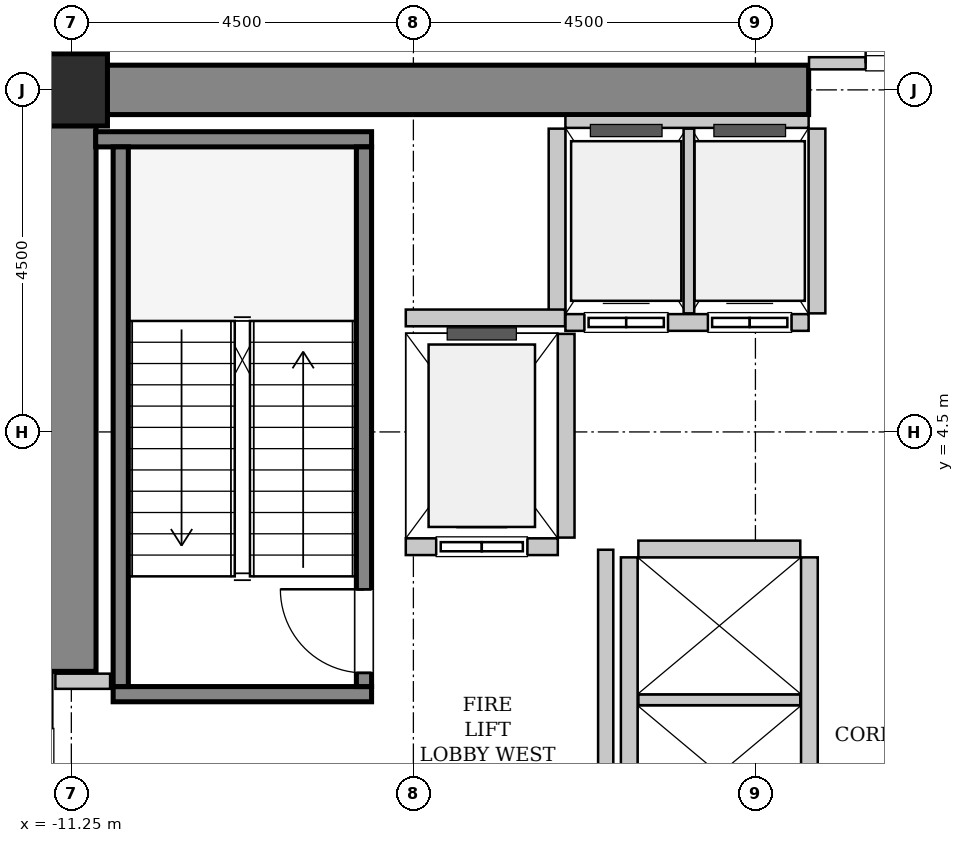
"""IFC4 building model, lengths in metres.
Left out: names, types, materials, properties, quantities, classifications, styles, units other than length and angle.
Written with IfcOpenShell. Run it as: python <this file> out.ifc"""

import sys

from ifc_helpers import new_model, si_unit, direction, frame, frame_2d, origin, origin_2d, place, context, subcontext, project, spatial, rectangle, hollow_rectangle, extrude, source, transform, mapped, element, fill, save


model = new_model("IFC4")
c1 = context("Model", 3, precision=1e-05, world=origin(), true_north=direction((0.0, 1.0)))
c2 = subcontext(c1, "Body", "Model", "MODEL_VIEW")
j1 = project(units=[si_unit("LENGTHUNIT", "METRE"), si_unit("PLANEANGLEUNIT", "RADIAN")], contexts=[c1])
p1 = place(None, origin())
s1 = spatial("IfcSite", under=j1, at=p1, CompositionType="ELEMENT")
p2 = place(p1, origin())
s2 = spatial("IfcBuilding", under=s1, at=p2, CompositionType="ELEMENT")
p3 = place(p2, frame((0.0, 0.0, 86.2)))
s3 = spatial("IfcBuildingStorey", under=s2, at=p3, CompositionType="ELEMENT", Elevation=86.2)
m1 = source(origin(), c2, "Body", "SweptSolid", [
    extrude(rectangle(XDim=10.025, YDim=0.65, at=frame_2d((5.012, 0.0))), origin(), (0.0, 0.0, 1.0), 4.6),
])
p4 = place(p3, frame((-11.575, 9.0, 0.0), z_axis=(0.0, 0.0, 1.0), x_axis=(1.0, 0.0, 0.0)))
e1 = element("IfcWall", 1, at=p4, inside=s3, PredefinedType="SHEAR", context=c2, shape_type="MappedRepresentation", body=[
    mapped(m1, transform((0.0, 0.0, 0.0), x_axis=(1.0, 0.0, 0.0), y_axis=(0.0, 1.0, 0.0), z_axis=(0.0, 0.0, 1.0), scale=1.0)),
])
m2 = source(origin(), c2, "Body", "SweptSolid", [
    extrude(rectangle(XDim=7.325, YDim=0.65, at=frame_2d((3.663, 0.0))), origin(), (0.0, 0.0, 1.0), 4.6),
])
p5 = place(p3, frame((-11.25, 1.35, 0.0), z_axis=(0.0, 0.0, 1.0), x_axis=(0.0, 1.0, 0.0)))
e2 = element("IfcWall", 2, at=p5, inside=s3, PredefinedType="SHEAR", context=c2, shape_type="MappedRepresentation", body=[
    mapped(m2, transform((0.0, 0.0, 0.0), x_axis=(1.0, 0.0, 0.0), y_axis=(0.0, 1.0, 0.0), z_axis=(0.0, 0.0, 1.0), scale=1.0)),
])
m3 = source(origin(), c2, "Body", "SweptSolid", [
    extrude(hollow_rectangle(XDim=0.95, YDim=0.95, WallThickness=0.045, InnerFilletRadius=0.045, OuterFilletRadius=0.09, at=origin_2d()), origin(), (0.0, 0.0, 1.0), 4.6),
])
p6 = place(p3, frame((-11.25, 9.0, 0.0), z_axis=(0.0, 0.0, 1.0), x_axis=(1.0, 0.0, 0.0)))
e3 = element("IfcColumn", 3, at=p6, inside=s3, PredefinedType="COLUMN", context=c2, shape_type="MappedRepresentation", body=[
    mapped(m3, transform((0.0, 0.0, 0.0), x_axis=(1.0, 0.0, 0.0), y_axis=(0.0, 1.0, 0.0), z_axis=(0.0, 0.0, 1.0), scale=1.0)),
])
m4 = source(origin(), c2, "Body", "SweptSolid", [
    extrude(rectangle(XDim=3.4, YDim=0.2, at=frame_2d((1.7, 0.0))), origin(), (0.0, 0.0, 1.0), 4.6),
])
p7 = place(p3, frame((-7.3, 1.05, 0.0), z_axis=(0.0, 0.0, 1.0), x_axis=(-1.0, 0.0, 0.0)))
e4 = element("IfcWall", 4, at=p7, inside=s3, PredefinedType="SOLIDWALL", context=c2, shape_type="MappedRepresentation", body=[
    mapped(m4, transform((0.0, 0.0, 0.0), x_axis=(1.0, 0.0, 0.0), y_axis=(0.0, 1.0, 0.0), z_axis=(0.0, 0.0, 1.0), scale=1.0)),
])
m5 = source(origin(), c2, "Body", "SweptSolid", [
    extrude(rectangle(XDim=3.63, YDim=0.2, at=frame_2d((1.815, 0.0))), origin(), (0.0, 0.0, 1.0), 4.6),
])
p8 = place(p3, frame((-7.3, 8.35, 0.0), z_axis=(0.0, 0.0, 1.0), x_axis=(-1.0, 0.0, 0.0)))
e5 = element("IfcWall", 5, at=p8, inside=s3, PredefinedType="SOLIDWALL", context=c2, shape_type="MappedRepresentation", body=[
    mapped(m5, transform((0.0, 0.0, 0.0), x_axis=(1.0, 0.0, 0.0), y_axis=(0.0, 1.0, 0.0), z_axis=(0.0, 0.0, 1.0), scale=1.0)),
])
m6 = source(origin(), c2, "Body", "SweptSolid", [
    extrude(rectangle(XDim=7.1, YDim=0.2, at=frame_2d((3.55, 0.0))), origin(), (0.0, 0.0, 1.0), 4.6),
])
p9 = place(p3, frame((-7.4, 1.15, 0.0), z_axis=(0.0, 0.0, 1.0), x_axis=(0.0, 1.0, 0.0)))
e6 = element("IfcWall", 6, at=p9, inside=s3, PredefinedType="SOLIDWALL", context=c2, shape_type="MappedRepresentation", body=[
    mapped(m6, transform((0.0, 0.0, 0.0), x_axis=(1.0, 0.0, 0.0), y_axis=(0.0, 1.0, 0.0), z_axis=(0.0, 0.0, 1.0), scale=1.0)),
])
p10 = place(p9, frame((0.18, 0.0, 0.0)))
e7 = element("IfcOpeningElement", 7, at=p10, cuts=e6, PredefinedType="OPENING", context=c2, shape_type="SweptSolid", body=[
    extrude(rectangle(XDim=1.1, YDim=2.15, at=frame_2d((0.55, 1.075))), frame((0.0, 0.11, 0.0), z_axis=(0.0, -1.0, 0.0), x_axis=(1.0, 0.0, 0.0)), (0.0, 0.0, 1.0), 0.22),
])
p11 = place(p3, frame((-10.6, 1.15, 0.0), z_axis=(0.0, 0.0, 1.0), x_axis=(0.0, 1.0, 0.0)))
e8 = element("IfcWall", 8, at=p11, inside=s3, PredefinedType="SOLIDWALL", context=c2, shape_type="MappedRepresentation", body=[
    mapped(m6, transform((0.0, 0.0, 0.0), x_axis=(1.0, 0.0, 0.0), y_axis=(0.0, 1.0, 0.0), z_axis=(0.0, 0.0, 1.0), scale=1.0)),
])
m7 = source(origin(), c2, "Body", "SweptSolid", [
    extrude(rectangle(XDim=2.0, YDim=0.22, at=frame_2d((1.0, 0.0))), origin(), (0.0, 0.0, 1.0), 4.335),
])
p12 = place(p3, frame((-6.85, 2.99, 0.0), z_axis=(0.0, 0.0, 1.0), x_axis=(1.0, 0.0, 0.0)))
e9 = element("IfcWall", 9, at=p12, inside=s3, PredefinedType="SOLIDWALL", context=c2, shape_type="MappedRepresentation", body=[
    mapped(m7, transform((0.0, 0.0, 0.0), x_axis=(1.0, 0.0, 0.0), y_axis=(0.0, 1.0, 0.0), z_axis=(0.0, 0.0, 1.0), scale=1.0)),
])
p13 = place(p12, frame((0.4, 0.0, 0.0)))
e10 = element("IfcOpeningElement", 10, at=p13, cuts=e9, PredefinedType="OPENING", context=c2, shape_type="SweptSolid", body=[
    extrude(rectangle(XDim=1.2, YDim=2.2, at=frame_2d((0.6, 1.1))), frame((0.0, 0.12, 0.0), z_axis=(0.0, -1.0, 0.0), x_axis=(1.0, 0.0, 0.0)), (0.0, 0.0, 1.0), 0.24),
])
m8 = source(origin(), c2, "Body", "SweptSolid", [
    extrude(rectangle(XDim=2.68, YDim=0.22, at=frame_2d((1.34, 0.0))), origin(), (0.0, 0.0, 1.0), 4.335),
])
p14 = place(p3, frame((-4.74, 3.11, 0.0), z_axis=(0.0, 0.0, 1.0), x_axis=(0.0, 1.0, 0.0)))
e11 = element("IfcWall", 11, at=p14, inside=s3, PredefinedType="SOLIDWALL", context=c2, shape_type="MappedRepresentation", body=[
    mapped(m8, transform((0.0, 0.0, 0.0), x_axis=(1.0, 0.0, 0.0), y_axis=(0.0, 1.0, 0.0), z_axis=(0.0, 0.0, 1.0), scale=1.0)),
])
m9 = source(origin(), c2, "Body", "SweptSolid", [
    extrude(rectangle(XDim=3.2, YDim=0.22, at=frame_2d((1.6, 0.0))), origin(), (0.0, 0.0, 1.0), 4.335),
])
p15 = place(p3, frame((-4.75, 5.94, 0.0), z_axis=(0.0, 0.0, 1.0), x_axis=(1.0, 0.0, 0.0)))
e12 = element("IfcWall", 12, at=p15, inside=s3, PredefinedType="SOLIDWALL", context=c2, shape_type="MappedRepresentation", body=[
    mapped(m9, transform((0.0, 0.0, 0.0), x_axis=(1.0, 0.0, 0.0), y_axis=(0.0, 1.0, 0.0), z_axis=(0.0, 0.0, 1.0), scale=1.0)),
])
p16 = place(p15, frame((0.25, 0.0, 0.0)))
e13 = element("IfcOpeningElement", 13, at=p16, cuts=e12, PredefinedType="OPENING", context=c2, shape_type="SweptSolid", body=[
    extrude(rectangle(XDim=1.1, YDim=2.2, at=frame_2d((0.55, 1.1))), frame((0.0, 0.12, 0.0), z_axis=(0.0, -1.0, 0.0), x_axis=(1.0, 0.0, 0.0)), (0.0, 0.0, 1.0), 0.24),
])
p17 = place(p15, frame((1.875, 0.0, 0.0)))
e14 = element("IfcOpeningElement", 14, at=p17, cuts=e12, PredefinedType="OPENING", context=c2, shape_type="SweptSolid", body=[
    extrude(rectangle(XDim=1.1, YDim=2.2, at=frame_2d((0.55, 1.1))), frame((0.0, 0.12, 0.0), z_axis=(0.0, -1.0, 0.0), x_axis=(1.0, 0.0, 0.0)), (0.0, 0.0, 1.0), 0.24),
])
m10 = source(origin(), c2, "Body", "SweptSolid", [
    extrude(rectangle(XDim=3.2, YDim=0.16, at=frame_2d((1.6, 0.0))), origin(), (0.0, 0.0, 1.0), 3.225),
])
p18 = place(p3, frame((-1.55, 8.58, 0.0), z_axis=(0.0, 0.0, 1.0), x_axis=(-1.0, 0.0, 0.0)))
e15 = element("IfcWall", 15, at=p18, inside=s3, PredefinedType="PARTITIONING", context=c2, shape_type="MappedRepresentation", body=[
    mapped(m10, transform((0.0, 0.0, 0.0), x_axis=(1.0, 0.0, 0.0), y_axis=(0.0, 1.0, 0.0), z_axis=(0.0, 0.0, 1.0), scale=1.0)),
])
m11 = source(origin(), c2, "Body", "SweptSolid", [
    extrude(rectangle(XDim=2.43, YDim=0.22, at=frame_2d((1.215, 0.0))), origin(), (0.0, 0.0, 1.0), 4.335),
])
p19 = place(p3, frame((-4.86, 8.49, 0.0), z_axis=(0.0, 0.0, 1.0), x_axis=(0.0, -1.0, 0.0)))
e16 = element("IfcWall", 16, at=p19, inside=s3, PredefinedType="SOLIDWALL", context=c2, shape_type="MappedRepresentation", body=[
    mapped(m11, transform((0.0, 0.0, 0.0), x_axis=(1.0, 0.0, 0.0), y_axis=(0.0, 1.0, 0.0), z_axis=(0.0, 0.0, 1.0), scale=1.0)),
])
m12 = source(origin(), c2, "Body", "SweptSolid", [
    extrude(rectangle(XDim=2.43, YDim=0.14, at=frame_2d((1.215, 0.0))), origin(), (0.0, 0.0, 1.0), 4.335),
])
p20 = place(p3, frame((-3.125, 6.06, 0.0), z_axis=(0.0, 0.0, 1.0), x_axis=(0.0, 1.0, 0.0)))
e17 = element("IfcWall", 17, at=p20, inside=s3, PredefinedType="PARTITIONING", context=c2, shape_type="MappedRepresentation", body=[
    mapped(m12, transform((0.0, 0.0, 0.0), x_axis=(1.0, 0.0, 0.0), y_axis=(0.0, 1.0, 0.0), z_axis=(0.0, 0.0, 1.0), scale=1.0)),
])
p21 = place(p3, frame((-1.44, 6.06, 0.0), z_axis=(0.0, 0.0, 1.0), x_axis=(0.0, 1.0, 0.0)))
e18 = element("IfcWall", 18, at=p21, inside=s3, PredefinedType="SOLIDWALL", context=c2, shape_type="MappedRepresentation", body=[
    mapped(m11, transform((0.0, 0.0, 0.0), x_axis=(1.0, 0.0, 0.0), y_axis=(0.0, 1.0, 0.0), z_axis=(0.0, 0.0, 1.0), scale=1.0)),
])
m13 = source(origin(), c2, "Body", "SweptSolid", [
    extrude(rectangle(XDim=5.7, YDim=0.22, at=frame_2d((2.85, 0.0))), origin(), (0.0, 0.0, 1.0), 4.335),
])
for number, where, z_axis, x_axis in (
    (19, (-1.54, -2.85, 0.0), (0.0, 0.0, 1.0), (0.0, 1.0, 0.0)),
    (20, (-3.91, 2.85, 0.0), (0.0, 0.0, 1.0), (0.0, -1.0, 0.0)),
):
    element("IfcWall", number, at=place(p3, frame(where, z_axis=z_axis, x_axis=x_axis)), inside=s3, PredefinedType="SOLIDWALL", context=c2, shape_type="MappedRepresentation", body=[
        mapped(m13, transform((0.0, 0.0, 0.0), x_axis=(1.0, 0.0, 0.0), y_axis=(0.0, 1.0, 0.0), z_axis=(0.0, 0.0, 1.0), scale=1.0)),
    ])
m14 = source(origin(), c2, "Body", "SweptSolid", [
    extrude(rectangle(XDim=2.13, YDim=0.14, at=frame_2d((1.065, 0.0))), origin(), (0.0, 0.0, 1.0), 4.335),
])
p22 = place(p3, frame((-3.79, 0.975, 0.0), z_axis=(0.0, 0.0, 1.0), x_axis=(1.0, 0.0, 0.0)))
e21 = element("IfcWall", 21, at=p22, inside=s3, PredefinedType="PARTITIONING", context=c2, shape_type="MappedRepresentation", body=[
    mapped(m14, transform((0.0, 0.0, 0.0), x_axis=(1.0, 0.0, 0.0), y_axis=(0.0, 1.0, 0.0), z_axis=(0.0, 0.0, 1.0), scale=1.0)),
])
m15 = source(origin(), c2, "Body", "SweptSolid", [
    extrude(rectangle(XDim=2.13, YDim=0.22, at=frame_2d((1.065, 0.0))), origin(), (0.0, 0.0, 1.0), 4.335),
])
p23 = place(p3, frame((-1.66, 2.96, 0.0), z_axis=(0.0, 0.0, 1.0), x_axis=(-1.0, 0.0, 0.0)))
e22 = element("IfcWall", 22, at=p23, inside=s3, PredefinedType="SOLIDWALL", context=c2, shape_type="MappedRepresentation", body=[
    mapped(m15, transform((0.0, 0.0, 0.0), x_axis=(1.0, 0.0, 0.0), y_axis=(0.0, 1.0, 0.0), z_axis=(0.0, 0.0, 1.0), scale=1.0)),
])
m16 = source(origin(), c2, "Body", "SweptSolid", [
    extrude(rectangle(XDim=2.095, YDim=0.22, at=frame_2d((1.048, 0.0))), origin(), (0.0, 0.0, 1.0), 4.335),
])
p24 = place(p3, frame((-6.85, 6.0, 0.0), z_axis=(0.0, 0.0, 1.0), x_axis=(1.0, 0.0, 0.0)))
e23 = element("IfcWall", 23, at=p24, inside=s3, PredefinedType="SOLIDWALL", context=c2, shape_type="MappedRepresentation", body=[
    mapped(m16, transform((0.0, 0.0, 0.0), x_axis=(1.0, 0.0, 0.0), y_axis=(0.0, 1.0, 0.0), z_axis=(0.0, 0.0, 1.0), scale=1.0)),
])
m17 = source(origin(), c2, "Body", "SweptSolid", [
    extrude(rectangle(XDim=5.9, YDim=0.2, at=frame_2d((2.95, 0.0))), origin(), (0.0, 0.0, 1.0), 4.335),
])
p25 = place(p3, frame((-4.22, -2.95, 0.0), z_axis=(0.0, 0.0, 1.0), x_axis=(0.0, 1.0, 0.0)))
e24 = element("IfcWall", 24, at=p25, inside=s3, PredefinedType="PARTITIONING", context=c2, shape_type="MappedRepresentation", body=[
    mapped(m17, transform((0.0, 0.0, 0.0), x_axis=(1.0, 0.0, 0.0), y_axis=(0.0, 1.0, 0.0), z_axis=(0.0, 0.0, 1.0), scale=1.0)),
])
m18 = source(origin(), c2, "Body", "SweptSolid", [
    extrude(rectangle(XDim=0.72, YDim=0.2, at=frame_2d((0.36, 0.0))), origin(), (0.0, 0.0, 1.0), 4.335),
])
p26 = place(p3, frame((-11.46, 1.22, 0.0), z_axis=(0.0, 0.0, 1.0), x_axis=(1.0, 0.0, 0.0)))
e25 = element("IfcWall", 25, at=p26, inside=s3, PredefinedType="PARTITIONING", context=c2, shape_type="MappedRepresentation", body=[
    mapped(m18, transform((0.0, 0.0, 0.0), x_axis=(1.0, 0.0, 0.0), y_axis=(0.0, 1.0, 0.0), z_axis=(0.0, 0.0, 1.0), scale=1.0)),
])
m19 = source(origin(), c2, "Body", "SweptSolid", [
    extrude(rectangle(XDim=3.09, YDim=0.16, at=frame_2d((1.545, 0.0))), origin(), (0.0, 0.0, 1.0), 3.225),
])
p27 = place(p3, frame((-1.545, 9.35, 0.0), z_axis=(0.0, 0.0, 1.0), x_axis=(1.0, 0.0, 0.0)))
e26 = element("IfcWall", 26, at=p27, inside=s3, PredefinedType="PARTITIONING", context=c2, shape_type="MappedRepresentation", body=[
    mapped(m19, transform((0.0, 0.0, 0.0), x_axis=(1.0, 0.0, 0.0), y_axis=(0.0, 1.0, 0.0), z_axis=(0.0, 0.0, 1.0), scale=1.0)),
])
p28 = place(p27, frame((0.745, 0.0, 0.0)))
e27 = element("IfcOpeningElement", 27, at=p28, cuts=e26, PredefinedType="OPENING", context=c2, shape_type="SweptSolid", body=[
    extrude(rectangle(XDim=1.6, YDim=2.3, at=frame_2d((0.8, 1.15))), frame((0.0, 0.09, 0.0), z_axis=(0.0, -1.0, 0.0), x_axis=(1.0, 0.0, 0.0)), (0.0, 0.0, 1.0), 0.18),
])
m20 = source(origin(), c2, "Body", "SweptSolid", [
    extrude(rectangle(XDim=1.1, YDim=2.15, at=frame_2d((0.55, 1.075))), frame((0.0, 0.025, 0.0), z_axis=(0.0, -1.0, 0.0), x_axis=(1.0, 0.0, 0.0)), (0.0, 0.0, 1.0), 0.05),
])
p29 = place(p10, origin())
e28 = element("IfcDoor", 28, at=p29, inside=s3, OperationType="SINGLE_SWING_RIGHT", PredefinedType="DOOR", context=c2, shape_type="MappedRepresentation", body=[
    mapped(m20, transform((0.0, 0.0, 0.0), x_axis=(1.0, 0.0, 0.0), y_axis=(0.0, 1.0, 0.0), z_axis=(0.0, 0.0, 1.0), scale=1.0)),
])
fill(e7, e28)
m21 = source(origin(), c2, "Body", "SweptSolid", [
    extrude(rectangle(XDim=1.2, YDim=2.2, at=frame_2d((0.6, 1.1))), frame((0.0, 0.025, 0.0), z_axis=(0.0, -1.0, 0.0), x_axis=(1.0, 0.0, 0.0)), (0.0, 0.0, 1.0), 0.05),
])
p30 = place(p13, origin())
e29 = element("IfcDoor", 29, at=p30, inside=s3, OperationType="SLIDING_TO_LEFT", PredefinedType="DOOR", context=c2, shape_type="MappedRepresentation", body=[
    mapped(m21, transform((0.0, 0.0, 0.0), x_axis=(1.0, 0.0, 0.0), y_axis=(0.0, 1.0, 0.0), z_axis=(0.0, 0.0, 1.0), scale=1.0)),
])
fill(e10, e29)
m22 = source(origin(), c2, "Body", "SweptSolid", [
    extrude(rectangle(XDim=1.1, YDim=2.2, at=frame_2d((0.55, 1.1))), frame((0.0, 0.025, 0.0), z_axis=(0.0, -1.0, 0.0), x_axis=(1.0, 0.0, 0.0)), (0.0, 0.0, 1.0), 0.05),
])
p31 = place(p16, origin())
e30 = element("IfcDoor", 30, at=p31, inside=s3, OperationType="DOUBLE_DOOR_SLIDING", PredefinedType="DOOR", context=c2, shape_type="MappedRepresentation", body=[
    mapped(m22, transform((0.0, 0.0, 0.0), x_axis=(1.0, 0.0, 0.0), y_axis=(0.0, 1.0, 0.0), z_axis=(0.0, 0.0, 1.0), scale=1.0)),
])
fill(e13, e30)
p32 = place(p17, origin())
e31 = element("IfcDoor", 31, at=p32, inside=s3, OperationType="DOUBLE_DOOR_SLIDING", PredefinedType="DOOR", context=c2, shape_type="MappedRepresentation", body=[
    mapped(m22, transform((0.0, 0.0, 0.0), x_axis=(1.0, 0.0, 0.0), y_axis=(0.0, 1.0, 0.0), z_axis=(0.0, 0.0, 1.0), scale=1.0)),
])
fill(e14, e31)
m23 = source(origin(), c2, "Body", "SweptSolid", [
    extrude(rectangle(XDim=1.6, YDim=2.3, at=frame_2d((0.8, 1.15))), frame((0.0, 0.025, 0.0), z_axis=(0.0, -1.0, 0.0), x_axis=(1.0, 0.0, 0.0)), (0.0, 0.0, 1.0), 0.05),
])
p33 = place(p28, origin())
e32 = element("IfcDoor", 32, at=p33, inside=s3, OperationType="DOUBLE_DOOR_SINGLE_SWING", PredefinedType="DOOR", context=c2, shape_type="MappedRepresentation", body=[
    mapped(m23, transform((0.0, 0.0, 0.0), x_axis=(1.0, 0.0, 0.0), y_axis=(0.0, 1.0, 0.0), z_axis=(0.0, 0.0, 1.0), scale=1.0)),
])
fill(e27, e32)
save(model, sys.argv[1])
